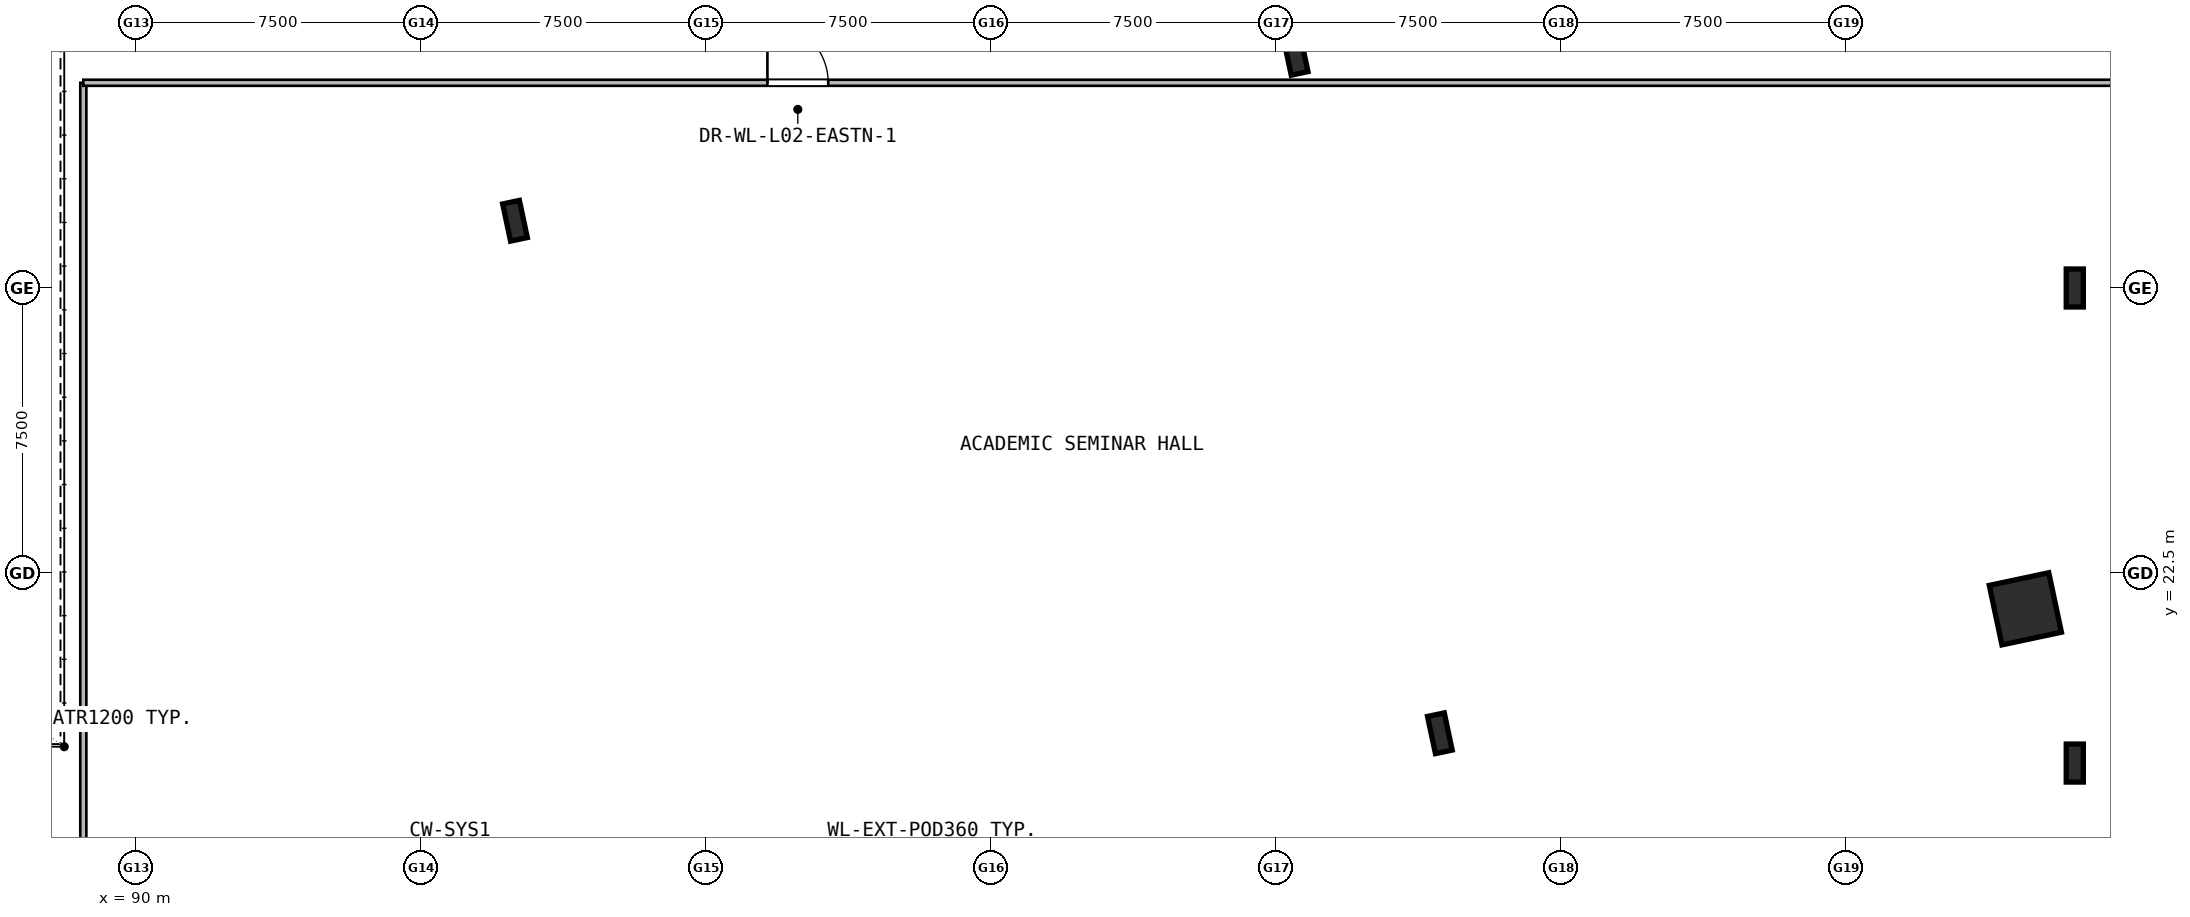
"""IFC4 building model, lengths in metres.
Left out: names, types, materials, properties, quantities, classifications, styles, units other than length and angle.
Written with IfcOpenShell. Run it as: python <this file> out.ifc"""

import sys

from ifc_helpers import new_model, si_unit, direction, frame, frame_2d, origin, origin_2d, place, context, subcontext, project, spatial, rectangle, hollow_rectangle, i_section, extrude, element, fill, save


model = new_model("IFC4")
c1 = context("Model", 3, precision=1e-05, world=origin(), true_north=direction((0.0, 1.0)))
c2 = subcontext(c1, "Body", "Model", "MODEL_VIEW")
j1 = project(units=[si_unit("LENGTHUNIT", "METRE"), si_unit("PLANEANGLEUNIT", "RADIAN")], contexts=[c1])
p1 = place(None, origin())
s1 = spatial("IfcSite", under=j1, at=p1, CompositionType="ELEMENT")
p2 = place(p1, origin())
s2 = spatial("IfcBuilding", under=s1, at=p2, CompositionType="ELEMENT")
p3 = place(p2, frame((0.0, 0.0, 10.8)))
s3 = spatial("IfcBuildingStorey", under=s2, at=p3, CompositionType="ELEMENT", Elevation=10.8)
for number, where, z_axis, x_axis in (
    (1, (99.958, 31.769, 0.0), (0.0, 0.0, 1.0), (0.978, 0.208, 0.0)),
    (2, (124.294, 18.284, 0.0), (0.0, 0.0, 1.0), (0.978, 0.208, 0.0)),
    (3, (120.499, 36.135, 0.0), (0.0, 0.0, 1.0), (0.978, 0.208, 0.0)),
):
    element("IfcColumn", number, at=place(p3, frame(where, z_axis=z_axis, x_axis=x_axis)), inside=s3, PredefinedType="COLUMN", context=c2, shape_type="SweptSolid", body=[
        extrude(i_section(OverallWidth=0.45, OverallDepth=1.0, WebThickness=0.022, FlangeThickness=0.04, at=origin_2d()), origin(), (0.0, 0.0, 1.0), 4.8),
    ])
p4 = place(p3, frame((139.699, 21.559, 0.0), z_axis=(0.0, 0.0, 1.0), x_axis=(0.978147600734, 0.207911690818, 0.0)))
e4 = element("IfcColumn", 4, at=p4, inside=s3, PredefinedType="COLUMN", context=c2, shape_type="SweptSolid", body=[
    extrude(hollow_rectangle(XDim=1.6, YDim=1.6, WallThickness=0.04, at=origin_2d()), origin(), (0.0, 0.0, 1.0), 4.8),
])
for number, where, z_axis, x_axis in (
    (5, (141.0, 17.5, 0.0), (0.0, 0.0, 1.0), (1.0, 0.0, 0.0)),
    (6, (141.0, 30.0, 0.0), (0.0, 0.0, 1.0), (1.0, 0.0, 0.0)),
):
    element("IfcColumn", number, at=place(p3, frame(where, z_axis=z_axis, x_axis=x_axis)), inside=s3, PredefinedType="COLUMN", context=c2, shape_type="SweptSolid", body=[
        extrude(i_section(OverallWidth=0.45, OverallDepth=1.0, WebThickness=0.022, FlangeThickness=0.04, at=origin_2d()), origin(), (0.0, 0.0, 1.0), 4.8),
    ])
p5 = place(p3, frame((88.6, 15.15, 0.0), z_axis=(0.0, 0.0, 1.0), x_axis=(0.0, 1.0, 0.0)))
e7 = element("IfcWall", 7, at=p5, inside=s3, PredefinedType="PARTITIONING", context=c2, shape_type="SweptSolid", body=[
    extrude(rectangle(XDim=20.25, YDim=0.16, at=frame_2d((10.125, 0.0))), origin(), (0.0, 0.0, 1.0), 4.48),
])
p6 = place(p3, frame((88.6, 35.4, 0.0), z_axis=(0.0, 0.0, 1.0), x_axis=(1.0, 0.0, 0.0)))
e8 = element("IfcWall", 8, at=p6, inside=s3, PredefinedType="PARTITIONING", context=c2, shape_type="SweptSolid", body=[
    extrude(rectangle(XDim=53.75, YDim=0.16, at=frame_2d((26.875, 0.0))), origin(), (0.0, 0.0, 1.0), 3.58),
])
p7 = place(p6, frame((18.0, 0.0, 0.0)))
e9 = element("IfcOpeningElement", 9, at=p7, cuts=e8, PredefinedType="OPENING", context=c2, shape_type="SweptSolid", body=[
    extrude(rectangle(XDim=1.6, YDim=2.2, at=frame_2d((0.8, 1.1))), frame((0.0, 0.09, 0.0), z_axis=(0.0, -1.0, 0.0), x_axis=(1.0, 0.0, 0.0)), (0.0, 0.0, 1.0), 0.18),
])
p8 = place(p7, origin())
e10 = element("IfcDoor", 10, at=p8, inside=s3, OperationType="DOUBLE_DOOR_SINGLE_SWING", PredefinedType="DOOR", context=c2, shape_type="SweptSolid", body=[
    extrude(rectangle(XDim=1.6, YDim=2.2, at=frame_2d((0.8, 1.1))), frame((0.0, 0.025, 0.0), z_axis=(0.0, -1.0, 0.0), x_axis=(1.0, 0.0, 0.0)), (0.0, 0.0, 1.0), 0.05),
])
fill(e9, e10)
save(model, sys.argv[1])
